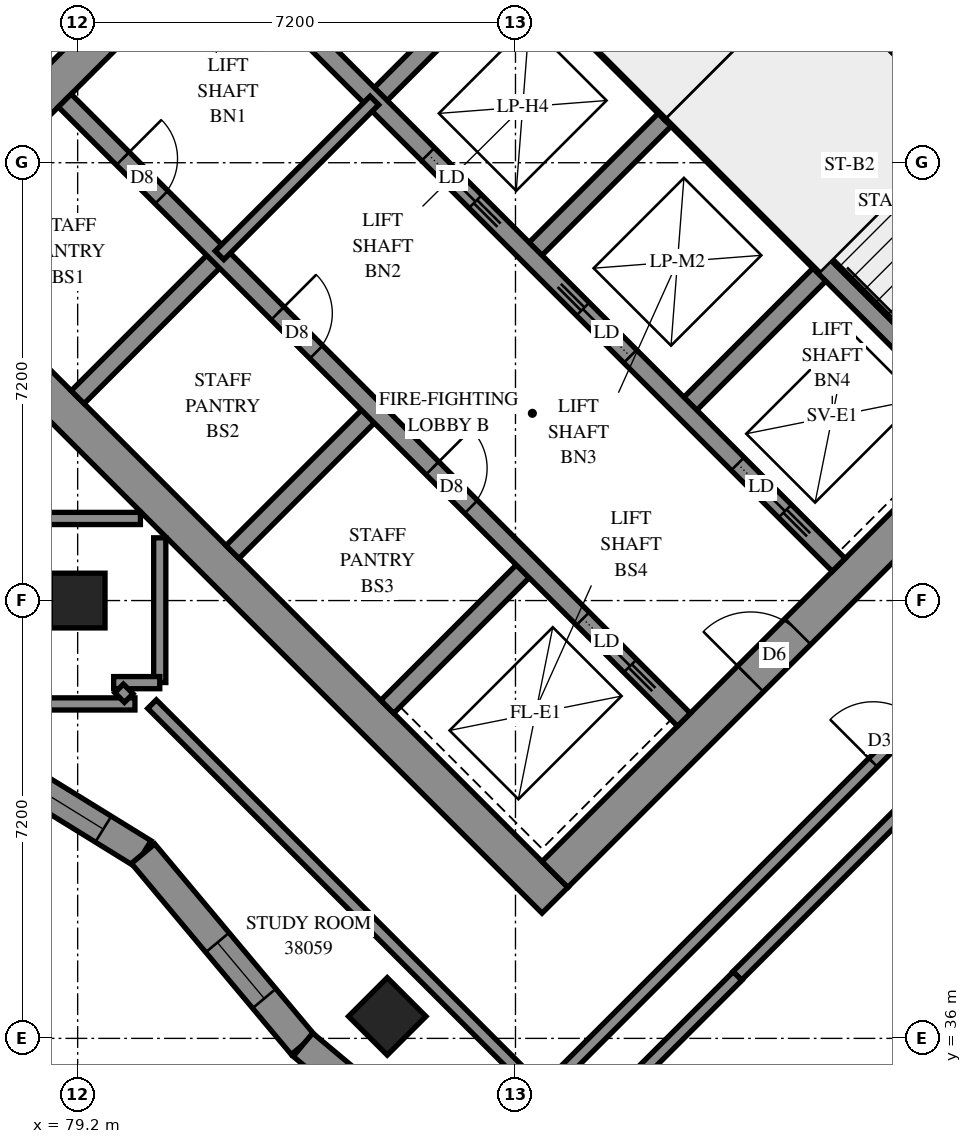
"""IFC4 building model, lengths in metres.
Left out: names, types, materials, properties, quantities, classifications, styles, units other than length and angle.
Written with IfcOpenShell. Run it as: python <this file> out.ifc"""

import sys

from ifc_helpers import new_model, si_unit, direction, frame, frame_2d, origin, origin_2d, place, context, subcontext, project, spatial, polyline, rectangle, outline, extrude, element, fill, save


model = new_model("IFC4")
c1 = context("Model", 3, precision=1e-05, world=origin(), true_north=direction((0.0, 1.0)))
c2 = subcontext(c1, "Body", "Model", "MODEL_VIEW")
j1 = project(units=[si_unit("LENGTHUNIT", "METRE"), si_unit("PLANEANGLEUNIT", "RADIAN")], contexts=[c1])
p1 = place(None, origin())
s1 = spatial("IfcSite", under=j1, at=p1, CompositionType="ELEMENT")
p2 = place(p1, origin())
s2 = spatial("IfcBuilding", under=s1, at=p2, CompositionType="ELEMENT")
p3 = place(p2, frame((0.0, 0.0, 142.2)))
s3 = spatial("IfcBuildingStorey", under=s2, at=p3, CompositionType="ELEMENT", Elevation=142.2)
for number, where, z_axis, x_axis in (
    (1, (79.2, 43.2, 0.0), (0.0, 0.0, 1.0), (1.0, 0.0, 0.0)),
    (2, (84.291, 36.362, 0.0), (0.0, 0.0, 1.0), (0.707, -0.707, 0.0)),
):
    element("IfcColumn", number, at=place(p3, frame(where, z_axis=z_axis, x_axis=x_axis)), inside=s3, PredefinedType="COLUMN", context=c2, shape_type="SweptSolid", body=[
        extrude(rectangle(XDim=0.9, YDim=0.9, at=origin_2d()), origin(), (0.0, 0.0, 1.0), 3.1),
    ])
p4 = place(p3, frame((76.018, 49.302, -0.3), z_axis=(0.0, 0.0, 1.0), x_axis=(0.7071067812, -0.7071067812, 0.0)))
e3 = element("IfcWall", 3, at=p4, inside=s3, PredefinedType="SHEAR", context=c2, shape_type="SweptSolid", body=[
    extrude(rectangle(XDim=15.6, YDim=0.6, at=frame_2d((7.8, 0.0))), origin(), (0.0, 0.0, 1.0), 2.7),
])
p5 = place(p3, frame((86.625, 59.908, -0.3), z_axis=(0.0, 0.0, 1.0), x_axis=(0.7071067812, -0.7071067812, 0.0)))
e4 = element("IfcWall", 4, at=p5, inside=s3, PredefinedType="SHEAR", context=c2, shape_type="SweptSolid", body=[
    extrude(rectangle(XDim=15.6, YDim=0.6, at=frame_2d((7.8, 0.0))), origin(), (0.0, 0.0, 1.0), 2.7),
])
p6 = place(p5, frame((10.6, 0.0, 0.3)))
e5 = element("IfcOpeningElement", 5, at=p6, cuts=e4, PredefinedType="OPENING", context=c2, shape_type="SweptSolid", body=[
    extrude(rectangle(XDim=0.8, YDim=2.1, at=frame_2d((0.4, 1.05))), frame((0.0, 0.31, 0.0), z_axis=(0.0, -1.0, 0.0), x_axis=(1.0, 0.0, 0.0)), (0.0, 0.0, 1.0), 0.62),
])
p7 = place(p3, frame((76.442, 49.302, -0.3), z_axis=(0.0, 0.0, 1.0), x_axis=(0.7071067812, 0.7071067812, 0.0)))
e6 = element("IfcWall", 6, at=p7, inside=s3, PredefinedType="SHEAR", context=c2, shape_type="SweptSolid", body=[
    extrude(rectangle(XDim=14.4, YDim=0.6, at=frame_2d((7.2, 0.0))), origin(), (0.0, 0.0, 1.0), 2.7),
])
p8 = place(p7, frame((4.55, 0.0, 0.3)))
e7 = element("IfcOpeningElement", 7, at=p8, cuts=e6, PredefinedType="OPENING", context=c2, shape_type="SweptSolid", body=[
    extrude(rectangle(XDim=1.1, YDim=2.1, at=frame_2d((0.55, 1.05))), frame((0.0, 0.31, 0.0), z_axis=(0.0, -1.0, 0.0), x_axis=(1.0, 0.0, 0.0)), (0.0, 0.0, 1.0), 0.62),
])
p9 = place(p7, frame((11.35, 0.0, 0.3)))
e8 = element("IfcOpeningElement", 8, at=p9, cuts=e6, PredefinedType="OPENING", context=c2, shape_type="SweptSolid", body=[
    extrude(rectangle(XDim=1.1, YDim=2.1, at=frame_2d((0.55, 1.05))), frame((0.0, 0.31, 0.0), z_axis=(0.0, -1.0, 0.0), x_axis=(1.0, 0.0, 0.0)), (0.0, 0.0, 1.0), 0.62),
])
p10 = place(p3, frame((87.049, 38.695, -0.3), z_axis=(0.0, 0.0, 1.0), x_axis=(0.7071067812, 0.7071067812, 0.0)))
e9 = element("IfcWall", 9, at=p10, inside=s3, PredefinedType="SHEAR", context=c2, shape_type="SweptSolid", body=[
    extrude(rectangle(XDim=14.4, YDim=0.6, at=frame_2d((7.2, 0.0))), origin(), (0.0, 0.0, 1.0), 2.7),
])
p11 = place(p10, frame((4.55, 0.0, 0.3)))
e10 = element("IfcOpeningElement", 10, at=p11, cuts=e9, PredefinedType="OPENING", context=c2, shape_type="SweptSolid", body=[
    extrude(rectangle(XDim=1.1, YDim=2.1, at=frame_2d((0.55, 1.05))), frame((0.0, 0.31, 0.0), z_axis=(0.0, -1.0, 0.0), x_axis=(1.0, 0.0, 0.0)), (0.0, 0.0, 1.0), 0.62),
])
p12 = place(p10, frame((11.35, 0.0, 0.3)))
e11 = element("IfcOpeningElement", 11, at=p12, cuts=e9, PredefinedType="OPENING", context=c2, shape_type="SweptSolid", body=[
    extrude(rectangle(XDim=1.1, YDim=2.1, at=frame_2d((0.55, 1.05))), frame((0.0, 0.31, 0.0), z_axis=(0.0, -1.0, 0.0), x_axis=(1.0, 0.0, 0.0)), (0.0, 0.0, 1.0), 0.62),
])
for number, where, z_axis, x_axis in (
    (12, (79.2, 46.544, 0.0), (0.0, 0.0, 1.0), (0.707, 0.707, 0.0)),
    (13, (84.079, 51.423, 0.0), (0.0, 0.0, 1.0), (0.707, 0.707, 0.0)),
):
    element("IfcWall", number, at=place(p3, frame(where, z_axis=z_axis, x_axis=x_axis)), inside=s3, PredefinedType="SOLIDWALL", context=c2, shape_type="SweptSolid", body=[
        extrude(rectangle(XDim=3.3, YDim=0.3, at=frame_2d((1.65, 0.0))), origin(), (0.0, 0.0, 1.0), 3.1),
    ])
p13 = place(p3, frame((81.746, 43.999, 0.0), z_axis=(0.0, 0.0, 1.0), x_axis=(0.7071067812, 0.7071067812, 0.0)))
e14 = element("IfcWall", 14, at=p13, inside=s3, PredefinedType="SOLIDWALL", context=c2, shape_type="SweptSolid", body=[
    extrude(rectangle(XDim=3.3, YDim=0.3, at=frame_2d((1.65, 0.0))), origin(), (0.0, 0.0, 1.0), 3.1),
])
p14 = place(p3, frame((86.625, 48.878, 0.0), z_axis=(0.0, 0.0, 1.0), x_axis=(0.7071067812, 0.7071067812, 0.0)))
e15 = element("IfcWall", 15, at=p14, inside=s3, PredefinedType="SOLIDWALL", context=c2, shape_type="SweptSolid", body=[
    extrude(rectangle(XDim=3.3, YDim=0.3, at=frame_2d((1.65, 0.0))), origin(), (0.0, 0.0, 1.0), 3.1),
])
p15 = place(p3, frame((84.291, 41.453, 0.0), z_axis=(0.0, 0.0, 1.0), x_axis=(0.7071067812, 0.7071067812, 0.0)))
e16 = element("IfcWall", 16, at=p15, inside=s3, PredefinedType="SOLIDWALL", context=c2, shape_type="SweptSolid", body=[
    extrude(rectangle(XDim=3.3, YDim=0.3, at=frame_2d((1.65, 0.0))), origin(), (0.0, 0.0, 1.0), 3.1),
])
p16 = place(p3, frame((89.17, 46.332, 0.0), z_axis=(0.0, 0.0, 1.0), x_axis=(0.7071067812, 0.7071067812, 0.0)))
e17 = element("IfcWall", 17, at=p16, inside=s3, PredefinedType="SOLIDWALL", context=c2, shape_type="SweptSolid", body=[
    extrude(rectangle(XDim=3.3, YDim=0.3, at=frame_2d((1.65, 0.0))), origin(), (0.0, 0.0, 1.0), 3.1),
])
p17 = place(p3, frame((78.988, 51.423, 0.0), z_axis=(0.0, 0.0, 1.0), x_axis=(0.7071067812, -0.7071067812, 0.0)))
e18 = element("IfcWall", 18, at=p17, inside=s3, PredefinedType="SOLIDWALL", context=c2, shape_type="SweptSolid", body=[
    extrude(rectangle(XDim=14.4, YDim=0.3, at=frame_2d((7.2, 0.0))), origin(), (0.0, 0.0, 1.0), 3.1),
])
p18 = place(p17, frame((1.35, 0.0, 0.0)))
e19 = element("IfcOpeningElement", 19, at=p18, cuts=e18, PredefinedType="OPENING", context=c2, shape_type="SweptSolid", body=[
    extrude(rectangle(XDim=0.9, YDim=2.1, at=frame_2d((0.45, 1.05))), frame((0.0, 0.16, 0.0), z_axis=(0.0, -1.0, 0.0), x_axis=(1.0, 0.0, 0.0)), (0.0, 0.0, 1.0), 0.32),
])
p19 = place(p17, frame((4.95, 0.0, 0.0)))
e20 = element("IfcOpeningElement", 20, at=p19, cuts=e18, PredefinedType="OPENING", context=c2, shape_type="SweptSolid", body=[
    extrude(rectangle(XDim=0.9, YDim=2.1, at=frame_2d((0.45, 1.05))), frame((0.0, 0.16, 0.0), z_axis=(0.0, -1.0, 0.0), x_axis=(1.0, 0.0, 0.0)), (0.0, 0.0, 1.0), 0.32),
])
p20 = place(p17, frame((8.55, 0.0, 0.0)))
e21 = element("IfcOpeningElement", 21, at=p20, cuts=e18, PredefinedType="OPENING", context=c2, shape_type="SweptSolid", body=[
    extrude(rectangle(XDim=0.9, YDim=2.1, at=frame_2d((0.45, 1.05))), frame((0.0, 0.16, 0.0), z_axis=(0.0, -1.0, 0.0), x_axis=(1.0, 0.0, 0.0)), (0.0, 0.0, 1.0), 0.32),
])
p21 = place(p17, frame((12.05, 0.0, 0.0)))
e22 = element("IfcOpeningElement", 22, at=p21, cuts=e18, PredefinedType="OPENING", context=c2, shape_type="SweptSolid", body=[
    extrude(rectangle(XDim=1.1, YDim=2.1, at=frame_2d((0.55, 1.05))), frame((0.0, 0.16, 0.0), z_axis=(0.0, -1.0, 0.0), x_axis=(1.0, 0.0, 0.0)), (0.0, 0.0, 1.0), 0.32),
])
p22 = place(p3, frame((81.534, 53.969, 0.0), z_axis=(0.0, 0.0, 1.0), x_axis=(0.707103309, -0.7071102534, 0.0)))
e23 = element("IfcWall", 23, at=p22, inside=s3, PredefinedType="SOLIDWALL", context=c2, shape_type="SweptSolid", body=[
    extrude(rectangle(XDim=14.4, YDim=0.3, at=frame_2d((7.2, 0.0))), origin(), (0.0, 0.0, 1.0), 3.1),
])
p23 = place(p22, frame((1.25, 0.0, 0.0)))
e24 = element("IfcOpeningElement", 24, at=p23, cuts=e23, PredefinedType="OPENING", context=c2, shape_type="SweptSolid", body=[
    extrude(rectangle(XDim=1.1, YDim=2.1, at=frame_2d((0.55, 1.05))), frame((0.0, 0.16, 0.0), z_axis=(0.0, -1.0, 0.0), x_axis=(1.0, 0.0, 0.0)), (0.0, 0.0, 1.0), 0.32),
])
p24 = place(p22, frame((4.85, 0.0, 0.0)))
e25 = element("IfcOpeningElement", 25, at=p24, cuts=e23, PredefinedType="OPENING", context=c2, shape_type="SweptSolid", body=[
    extrude(rectangle(XDim=1.1, YDim=2.1, at=frame_2d((0.55, 1.05))), frame((0.0, 0.16, 0.0), z_axis=(0.0, -1.0, 0.0), x_axis=(1.0, 0.0, 0.0)), (0.0, 0.0, 1.0), 0.32),
])
p25 = place(p22, frame((8.45, 0.0, 0.0)))
e26 = element("IfcOpeningElement", 26, at=p25, cuts=e23, PredefinedType="OPENING", context=c2, shape_type="SweptSolid", body=[
    extrude(rectangle(XDim=1.1, YDim=2.1, at=frame_2d((0.55, 1.05))), frame((0.0, 0.16, 0.0), z_axis=(0.0, -1.0, 0.0), x_axis=(1.0, 0.0, 0.0)), (0.0, 0.0, 1.0), 0.32),
])
p26 = place(p22, frame((12.05, 0.0, 0.0)))
e27 = element("IfcOpeningElement", 27, at=p26, cuts=e23, PredefinedType="OPENING", context=c2, shape_type="SweptSolid", body=[
    extrude(rectangle(XDim=1.1, YDim=2.1, at=frame_2d((0.55, 1.05))), frame((0.0, 0.16, 0.0), z_axis=(0.0, -1.0, 0.0), x_axis=(1.0, 0.0, 0.0)), (0.0, 0.0, 1.0), 0.32),
])
for number, where, z_axis, x_axis in (
    (28, (83.867, 56.302, 0.0), (0.0, 0.0, 1.0), (0.707, -0.707, 0.0)),
    (29, (88.958, 51.211, 0.0), (0.0, 0.0, 1.0), (0.707, -0.707, 0.0)),
):
    element("IfcWall", number, at=place(p3, frame(where, z_axis=z_axis, x_axis=x_axis)), inside=s3, PredefinedType="SOLIDWALL", context=c2, shape_type="SweptSolid", body=[
        extrude(rectangle(XDim=7.2, YDim=0.3, at=frame_2d((3.6, 0.0))), origin(), (0.0, 0.0, 1.0), 3.1),
    ])
p27 = place(p3, frame((88.958, 51.211, 0.0), z_axis=(0.0, 0.0, 1.0), x_axis=(0.7071067812, 0.7071067812, 0.0)))
e30 = element("IfcWall", 30, at=p27, inside=s3, PredefinedType="SOLIDWALL", context=c2, shape_type="SweptSolid", body=[
    extrude(rectangle(XDim=4.2, YDim=0.3, at=frame_2d((2.1, 0.0))), origin(), (0.0, 0.0, 1.0), 3.1),
])
p28 = place(p3, frame((76.659, 41.27, 0.0), z_axis=(0.0, 0.0, 1.0), x_axis=(0.8508843037, -0.5253531209, 0.0)))
e31 = element("IfcWall", 31, at=p28, inside=s3, PredefinedType="SOLIDWALL", context=c2, shape_type="SweptSolid", body=[
    extrude(outline(polyline([(0.035, -0.25), (4.21, -0.25), (4.291, 0.25), (-0.035, 0.25), (0.035, -0.25)])), origin(), (0.0, 0.0, 1.0), 3.1),
])
p29 = place(p28, frame((0.707, 0.0, 0.45)))
e32 = element("IfcOpeningElement", 32, at=p29, cuts=e31, PredefinedType="OPENING", context=c2, shape_type="SweptSolid", body=[
    extrude(rectangle(XDim=1.2, YDim=2.5, at=frame_2d((0.6, 1.25))), frame((0.0, 0.26, 0.0), z_axis=(0.0, -1.0, 0.0), x_axis=(1.0, 0.0, 0.0)), (0.0, 0.0, 1.0), 0.52),
])
p30 = place(p28, frame((2.282, 0.0, 0.45)))
e33 = element("IfcOpeningElement", 33, at=p30, cuts=e31, PredefinedType="OPENING", context=c2, shape_type="SweptSolid", body=[
    extrude(rectangle(XDim=1.2, YDim=2.5, at=frame_2d((0.6, 1.25))), frame((0.0, 0.26, 0.0), z_axis=(0.0, -1.0, 0.0), x_axis=(1.0, 0.0, 0.0)), (0.0, 0.0, 1.0), 0.52),
])
p31 = place(p3, frame((80.276, 39.037, 0.0), z_axis=(0.0, 0.0, 1.0), x_axis=(0.6417604293, -0.7669051776, 0.0)))
e34 = element("IfcWall", 34, at=p31, inside=s3, PredefinedType="SOLIDWALL", context=c2, shape_type="SweptSolid", body=[
    extrude(outline(polyline([(0.041, -0.25), (4.119, -0.25), (4.075, 0.25), (-0.041, 0.25), (0.041, -0.25)])), origin(), (0.0, 0.0, 1.0), 3.1),
])
p32 = place(p31, frame((1.905, 0.0, 0.45)))
e35 = element("IfcOpeningElement", 35, at=p32, cuts=e34, PredefinedType="OPENING", context=c2, shape_type="SweptSolid", body=[
    extrude(rectangle(XDim=1.2, YDim=2.5, at=frame_2d((0.6, 1.25))), frame((0.0, 0.26, 0.0), z_axis=(0.0, -1.0, 0.0), x_axis=(1.0, 0.0, 0.0)), (0.0, 0.0, 1.0), 0.52),
])
p33 = place(p3, frame((82.905, 35.895, 0.0), z_axis=(0.0, 0.0, 1.0), x_axis=(0.7669033121, -0.6417626585, 0.0)))
e36 = element("IfcWall", 36, at=p33, inside=s3, PredefinedType="SOLIDWALL", context=c2, shape_type="SweptSolid", body=[
    extrude(outline(polyline([(-0.022, -0.25), (4.056, -0.25), (4.101, 0.25), (0.022, 0.25), (-0.022, -0.25)])), origin(), (0.0, 0.0, 1.0), 3.1),
])
p34 = place(p33, frame((0.866, 0.0, 0.45)))
e37 = element("IfcOpeningElement", 37, at=p34, cuts=e36, PredefinedType="OPENING", context=c2, shape_type="SweptSolid", body=[
    extrude(rectangle(XDim=2.8, YDim=2.5, at=frame_2d((1.4, 1.25))), frame((0.0, 0.26, 0.0), z_axis=(0.0, -1.0, 0.0), x_axis=(1.0, 0.0, 0.0)), (0.0, 0.0, 1.0), 0.52),
])
p35 = place(p3, frame((91.313, 53.354, 0.0), z_axis=(0.0, 0.0, 1.0), x_axis=(0.7071140275, -0.7070995348, 0.0)))
e38 = element("IfcWall", 38, at=p35, inside=s3, PredefinedType="PARTITIONING", context=c2, shape_type="SweptSolid", body=[
    extrude(rectangle(XDim=6.9, YDim=0.15, at=frame_2d((3.45, 0.0))), origin(), (0.0, 0.0, 1.0), 3.1),
])
p36 = place(p3, frame((81.534, 48.878, 0.0), z_axis=(0.0, 0.0, 1.0), x_axis=(0.707092892, 0.7071206701, 0.0)))
e39 = element("IfcWall", 39, at=p36, inside=s3, PredefinedType="PARTITIONING", context=c2, shape_type="SweptSolid", body=[
    extrude(rectangle(XDim=3.6, YDim=0.2, at=frame_2d((1.8, 0.0))), origin(), (0.0, 0.0, 1.0), 3.1),
])
p37 = place(p3, frame((80.423, 41.497, 0.0), z_axis=(0.0, 0.0, 1.0), x_axis=(0.7071067812, -0.7071067812, 0.0)))
e40 = element("IfcWall", 40, at=p37, inside=s3, PredefinedType="PARTITIONING", context=c2, shape_type="SweptSolid", body=[
    extrude(rectangle(XDim=9.065, YDim=0.2, at=frame_2d((4.532, 0.0))), origin(), (0.0, 0.0, 1.0), 3.1),
])
p38 = place(p3, frame((86.837, 35.091, 0.0), z_axis=(0.0, 0.0, 1.0), x_axis=(0.7071067812, 0.7071067812, 0.0)))
e41 = element("IfcWall", 41, at=p38, inside=s3, PredefinedType="PARTITIONING", context=c2, shape_type="SweptSolid", body=[
    extrude(rectangle(XDim=8.898, YDim=0.2, at=frame_2d((4.449, 0.0))), origin(), (0.0, 0.0, 1.0), 3.1),
])
p39 = place(p38, frame((7.7, 0.0, 0.0)))
e42 = element("IfcOpeningElement", 42, at=p39, cuts=e41, PredefinedType="OPENING", context=c2, shape_type="SweptSolid", body=[
    extrude(rectangle(XDim=1.0, YDim=2.1, at=frame_2d((0.5, 1.05))), frame((0.0, 0.11, 0.0), z_axis=(0.0, -1.0, 0.0), x_axis=(1.0, 0.0, 0.0)), (0.0, 0.0, 1.0), 0.22),
])
p40 = place(p3, frame((90.047, 37.029, 0.0), z_axis=(0.0, 0.0, 1.0), x_axis=(0.7071067812, 0.7071067812, 0.0)))
e43 = element("IfcWall", 43, at=p40, inside=s3, PredefinedType="PARTITIONING", context=c2, shape_type="SweptSolid", body=[
    extrude(rectangle(XDim=5.258, YDim=0.2, at=frame_2d((2.629, 0.0))), origin(), (0.0, 0.0, 1.0), 3.1),
])
p41 = place(p3, frame((86.335, 33.306, 0.0), z_axis=(0.0, 0.0, 1.0), x_axis=(0.7069165351, 0.7072969761, 0.0)))
e44 = element("IfcWall", 44, at=p41, inside=s3, PredefinedType="PARTITIONING", context=c2, shape_type="SweptSolid", body=[
    extrude(rectangle(XDim=5.257, YDim=0.2, at=frame_2d((2.629, 0.0))), origin(), (0.0, 0.0, 1.0), 3.1),
])
p42 = place(p3, frame((77.502, 41.5, 0.0), z_axis=(0.0, 0.0, 1.0), x_axis=(1.0, 0.0, 0.0)))
e45 = element("IfcWall", 45, at=p42, inside=s3, PredefinedType="PARTITIONING", context=c2, shape_type="SweptSolid", body=[
    extrude(rectangle(XDim=2.64, YDim=0.2, at=frame_2d((1.32, 0.0))), origin(), (0.0, 0.0, 1.0), 3.1),
])
for number, where, z_axis, x_axis in (
    (46, (80.55, 41.852, 0.0), (0.0, 0.0, 1.0), (0.0, 1.0, 0.0)),
    (47, (77.852, 44.55, 0.0), (0.0, 0.0, 1.0), (1.0, 0.0, 0.0)),
):
    element("IfcWall", number, at=place(p3, frame(where, z_axis=z_axis, x_axis=x_axis)), inside=s3, PredefinedType="PARTITIONING", context=c2, shape_type="SweptSolid", body=[
        extrude(rectangle(XDim=2.38, YDim=0.2, at=frame_2d((1.19, 0.0))), origin(), (0.0, 0.0, 1.0), 3.1),
    ])
p43 = place(p3, frame((79.792, 41.85, 0.0), z_axis=(0.0, 0.0, 1.0), x_axis=(1.0, 0.0, 0.0)))
e48 = element("IfcWall", 48, at=p43, inside=s3, PredefinedType="PARTITIONING", context=c2, shape_type="SweptSolid", body=[
    extrude(rectangle(XDim=0.758, YDim=0.2, at=frame_2d((0.379, 0.0))), origin(), (0.0, 0.0, 1.0), 3.1),
])
p44 = place(p3, frame((79.881, 41.755, 0.0), z_axis=(0.0, 0.0, 1.0), x_axis=(0.7071067812, -0.7071067812, 0.0)))
e49 = element("IfcWall", 49, at=p44, inside=s3, PredefinedType="PARTITIONING", context=c2, shape_type="SweptSolid", body=[
    extrude(rectangle(XDim=0.225, YDim=0.2, at=frame_2d((0.113, 0.0))), origin(), (0.0, 0.0, 1.0), 3.1),
])
p45 = place(p30, origin())
e50 = element("IfcWindow", 50, at=p45, inside=s3, PartitioningType="SINGLE_PANEL", PredefinedType="WINDOW", context=c2, shape_type="SweptSolid", body=[
    extrude(rectangle(XDim=1.2, YDim=2.5, at=frame_2d((0.6, 1.25))), frame((0.0, 0.18, 0.0), z_axis=(0.0, -1.0, 0.0), x_axis=(1.0, 0.0, 0.0)), (0.0, 0.0, 1.0), 0.06),
])
fill(e33, e50)
p46 = place(p32, origin())
e51 = element("IfcWindow", 51, at=p46, inside=s3, PartitioningType="SINGLE_PANEL", PredefinedType="WINDOW", context=c2, shape_type="SweptSolid", body=[
    extrude(rectangle(XDim=1.2, YDim=2.5, at=frame_2d((0.6, 1.25))), frame((0.0, 0.18, 0.0), z_axis=(0.0, -1.0, 0.0), x_axis=(1.0, 0.0, 0.0)), (0.0, 0.0, 1.0), 0.06),
])
fill(e35, e51)
p47 = place(p11, origin())
e52 = element("IfcDoor", 52, at=p47, inside=s3, OperationType="DOUBLE_DOOR_SINGLE_SWING", PredefinedType="DOOR", context=c2, shape_type="SweptSolid", body=[
    extrude(rectangle(XDim=1.1, YDim=2.1, at=frame_2d((0.55, 1.05))), frame((0.0, 0.025, 0.0), z_axis=(0.0, -1.0, 0.0), x_axis=(1.0, 0.0, 0.0)), (0.0, 0.0, 1.0), 0.05),
])
fill(e10, e52)
p48 = place(p18, origin())
e53 = element("IfcDoor", 53, at=p48, inside=s3, OperationType="SINGLE_SWING_LEFT", PredefinedType="DOOR", context=c2, shape_type="SweptSolid", body=[
    extrude(rectangle(XDim=0.9, YDim=2.1, at=frame_2d((0.45, 1.05))), frame((0.0, 0.025, 0.0), z_axis=(0.0, -1.0, 0.0), x_axis=(1.0, 0.0, 0.0)), (0.0, 0.0, 1.0), 0.05),
])
fill(e19, e53)
p49 = place(p19, origin())
e54 = element("IfcDoor", 54, at=p49, inside=s3, OperationType="SINGLE_SWING_LEFT", PredefinedType="DOOR", context=c2, shape_type="SweptSolid", body=[
    extrude(rectangle(XDim=0.9, YDim=2.1, at=frame_2d((0.45, 1.05))), frame((0.0, 0.025, 0.0), z_axis=(0.0, -1.0, 0.0), x_axis=(1.0, 0.0, 0.0)), (0.0, 0.0, 1.0), 0.05),
])
fill(e20, e54)
p50 = place(p20, origin())
e55 = element("IfcDoor", 55, at=p50, inside=s3, OperationType="SINGLE_SWING_LEFT", PredefinedType="DOOR", context=c2, shape_type="SweptSolid", body=[
    extrude(rectangle(XDim=0.9, YDim=2.1, at=frame_2d((0.45, 1.05))), frame((0.0, 0.025, 0.0), z_axis=(0.0, -1.0, 0.0), x_axis=(1.0, 0.0, 0.0)), (0.0, 0.0, 1.0), 0.05),
])
fill(e21, e55)
p51 = place(p21, origin())
e56 = element("IfcDoor", 56, at=p51, inside=s3, OperationType="SLIDING_TO_RIGHT", PredefinedType="DOOR", context=c2, shape_type="SweptSolid", body=[
    extrude(rectangle(XDim=1.1, YDim=2.1, at=frame_2d((0.55, 1.05))), frame((0.0, 0.025, 0.0), z_axis=(0.0, -1.0, 0.0), x_axis=(1.0, 0.0, 0.0)), (0.0, 0.0, 1.0), 0.05),
])
fill(e22, e56)
p52 = place(p24, origin())
e57 = element("IfcDoor", 57, at=p52, inside=s3, OperationType="SLIDING_TO_RIGHT", PredefinedType="DOOR", context=c2, shape_type="SweptSolid", body=[
    extrude(rectangle(XDim=1.1, YDim=2.1, at=frame_2d((0.55, 1.05))), frame((0.0, 0.025, 0.0), z_axis=(0.0, -1.0, 0.0), x_axis=(1.0, 0.0, 0.0)), (0.0, 0.0, 1.0), 0.05),
])
fill(e25, e57)
p53 = place(p25, origin())
e58 = element("IfcDoor", 58, at=p53, inside=s3, OperationType="SLIDING_TO_LEFT", PredefinedType="DOOR", context=c2, shape_type="SweptSolid", body=[
    extrude(rectangle(XDim=1.1, YDim=2.1, at=frame_2d((0.55, 1.05))), frame((0.0, 0.025, 0.0), z_axis=(0.0, -1.0, 0.0), x_axis=(1.0, 0.0, 0.0)), (0.0, 0.0, 1.0), 0.05),
])
fill(e26, e58)
p54 = place(p26, origin())
e59 = element("IfcDoor", 59, at=p54, inside=s3, OperationType="SLIDING_TO_RIGHT", PredefinedType="DOOR", context=c2, shape_type="SweptSolid", body=[
    extrude(rectangle(XDim=1.1, YDim=2.1, at=frame_2d((0.55, 1.05))), frame((0.0, 0.025, 0.0), z_axis=(0.0, -1.0, 0.0), x_axis=(1.0, 0.0, 0.0)), (0.0, 0.0, 1.0), 0.05),
])
fill(e27, e59)
p55 = place(p39, origin())
e60 = element("IfcDoor", 60, at=p55, inside=s3, OperationType="SINGLE_SWING_LEFT", PredefinedType="DOOR", context=c2, shape_type="SweptSolid", body=[
    extrude(rectangle(XDim=1.0, YDim=2.1, at=frame_2d((0.5, 1.05))), frame((0.0, 0.025, 0.0), z_axis=(0.0, -1.0, 0.0), x_axis=(1.0, 0.0, 0.0)), (0.0, 0.0, 1.0), 0.05),
])
fill(e42, e60)
save(model, sys.argv[1])
